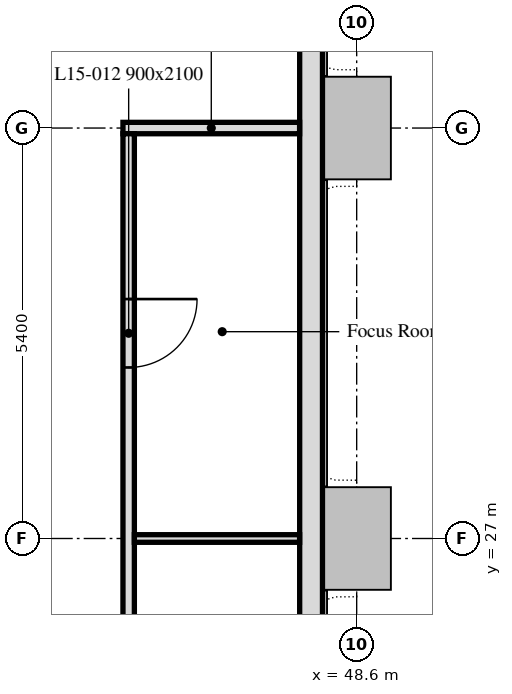
"""IFC4 building model, lengths in metres.
Left out: names, types, materials, properties, quantities, classifications, styles, units other than length and angle.
Written with IfcOpenShell. Run it as: python <this file> out.ifc"""

import sys

from ifc_helpers import new_model, si_unit, direction, frame, frame_2d, origin, place, context, subcontext, project, spatial, rectangle, extrude, element, fill, save


model = new_model("IFC4")
c1 = context("Model", 3, precision=1e-05, world=origin(), true_north=direction((0.0, 1.0)))
c2 = subcontext(c1, "Body", "Model", "MODEL_VIEW")
j1 = project(units=[si_unit("LENGTHUNIT", "METRE"), si_unit("PLANEANGLEUNIT", "RADIAN")], contexts=[c1])
p1 = place(None, origin())
s1 = spatial("IfcSite", under=j1, at=p1, CompositionType="ELEMENT")
p2 = place(p1, origin())
s2 = spatial("IfcBuilding", under=s1, at=p2, CompositionType="ELEMENT")
p3 = place(p2, frame((0.0, 0.0, 68.8)))
s3 = spatial("IfcBuildingStorey", under=s2, at=p3, CompositionType="ELEMENT", Elevation=68.8)
p4 = place(p3, frame((48.0, 10.986, 0.0), z_axis=(0.0, 0.0, 1.0), x_axis=(0.0, 1.0, 0.0)))
e1 = element("IfcWall", 1, at=p4, inside=s3, PredefinedType="SOLIDWALL", context=c2, shape_type="SweptSolid", body=[
    extrude(rectangle(XDim=32.027, YDim=0.3, at=frame_2d((16.014, 0.0))), origin(), (0.0, 0.0, 1.0), 3.5),
])
p5 = place(p4, frame((27.814, 0.0, 0.9)))
e2 = element("IfcOpeningElement", 2, at=p5, cuts=e1, PredefinedType="OPENING", context=c2, shape_type="SweptSolid", body=[
    extrude(rectangle(XDim=3.4, YDim=1.7, at=frame_2d((1.7, 0.85))), frame((0.0, 0.16, 0.0), z_axis=(0.0, -1.0, 0.0), x_axis=(1.0, 0.0, 0.0)), (0.0, 0.0, 1.0), 0.32),
])
p6 = place(p3, frame((47.849, 32.4, 0.0), z_axis=(0.0, 0.0, 1.0), x_axis=(-1.0, 0.0, 0.0)))
e3 = element("IfcWall", 3, at=p6, inside=s3, PredefinedType="PARTITIONING", context=c2, shape_type="SweptSolid", body=[
    extrude(rectangle(XDim=2.324, YDim=0.15, at=frame_2d((1.162, 0.0))), origin(), (0.0, 0.0, 1.0), 2.75),
])
p7 = place(p3, frame((45.6, 32.325, 0.0), z_axis=(0.0, 0.0, 1.0), x_axis=(0.0, -1.0, 0.0)))
e4 = element("IfcWall", 4, at=p7, inside=s3, PredefinedType="PARTITIONING", context=c2, shape_type="SweptSolid", body=[
    extrude(rectangle(XDim=16.2, YDim=0.15, at=frame_2d((8.1, 0.0))), origin(), (0.0, 0.0, 1.0), 2.75),
])
p8 = place(p7, frame((12.975, 0.0, 0.0)))
e5 = element("IfcOpeningElement", 5, at=p8, cuts=e4, PredefinedType="OPENING", context=c2, shape_type="SweptSolid", body=[
    extrude(rectangle(XDim=0.9, YDim=2.1, at=frame_2d((0.45, 1.05))), frame((0.0, 0.075, 0.0), z_axis=(0.0, -1.0, 0.0), x_axis=(1.0, 0.0, 0.0)), (0.0, 0.0, 1.0), 0.15),
])
p9 = place(p7, frame((7.575, 0.0, 0.0)))
e6 = element("IfcOpeningElement", 6, at=p9, cuts=e4, PredefinedType="OPENING", context=c2, shape_type="SweptSolid", body=[
    extrude(rectangle(XDim=0.9, YDim=2.1, at=frame_2d((0.45, 1.05))), frame((0.0, 0.075, 0.0), z_axis=(0.0, -1.0, 0.0), x_axis=(1.0, 0.0, 0.0)), (0.0, 0.0, 1.0), 0.15),
])
p10 = place(p7, frame((2.175, 0.0, 0.0)))
e7 = element("IfcOpeningElement", 7, at=p10, cuts=e4, PredefinedType="OPENING", context=c2, shape_type="SweptSolid", body=[
    extrude(rectangle(XDim=0.9, YDim=2.1, at=frame_2d((0.45, 1.05))), frame((0.0, 0.075, 0.0), z_axis=(0.0, -1.0, 0.0), x_axis=(1.0, 0.0, 0.0)), (0.0, 0.0, 1.0), 0.15),
])
p11 = place(p3, frame((45.675, 27.0, 0.0), z_axis=(0.0, 0.0, 1.0), x_axis=(1.0, 0.0, 0.0)))
e8 = element("IfcWall", 8, at=p11, inside=s3, PredefinedType="PARTITIONING", context=c2, shape_type="SweptSolid", body=[
    extrude(rectangle(XDim=2.174, YDim=0.1, at=frame_2d((1.087, 0.0))), origin(), (0.0, 0.0, 1.0), 2.75),
])
p12 = place(p10, origin())
e9 = element("IfcDoor", 9, at=p12, inside=s3, OperationType="SINGLE_SWING_LEFT", PredefinedType="DOOR", context=c2, shape_type="SweptSolid", body=[
    extrude(rectangle(XDim=0.9, YDim=2.1, at=frame_2d((0.45, 1.05))), frame((0.0, 0.025, 0.0), z_axis=(0.0, -1.0, 0.0), x_axis=(1.0, 0.0, 0.0)), (0.0, 0.0, 1.0), 0.05),
])
fill(e7, e9)
save(model, sys.argv[1])
